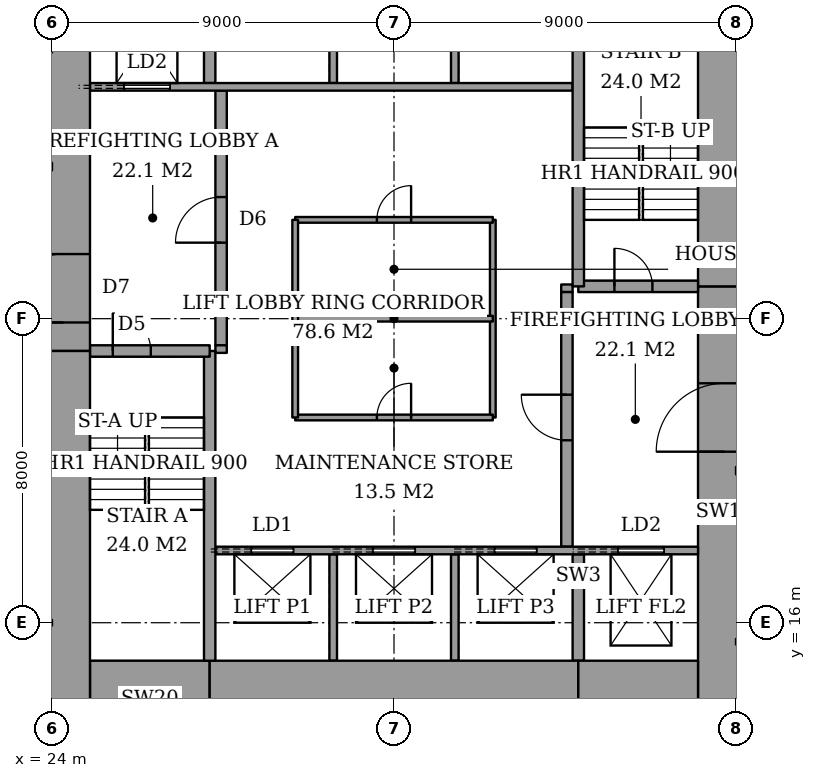
"""IFC4 building model, lengths in metres.
Left out: names, types, materials, properties, quantities, classifications, styles, units other than length and angle.
Written with IfcOpenShell. Run it as: python <this file> out.ifc"""

import sys

from ifc_helpers import new_model, si_unit, direction, frame, frame_2d, origin, place, context, subcontext, project, spatial, rectangle, extrude, element, fill, save


model = new_model("IFC4")
c1 = context("Model", 3, precision=1e-05, world=origin(), true_north=direction((0.0, 1.0)))
c2 = subcontext(c1, "Body", "Model", "MODEL_VIEW")
j1 = project(units=[si_unit("LENGTHUNIT", "METRE"), si_unit("PLANEANGLEUNIT", "RADIAN")], contexts=[c1])
p1 = place(None, origin())
s1 = spatial("IfcSite", under=j1, at=p1, CompositionType="ELEMENT")
p2 = place(p1, origin())
s2 = spatial("IfcBuilding", under=s1, at=p2, CompositionType="ELEMENT")
p3 = place(p2, frame((0.0, 0.0, 40.4)))
s3 = spatial("IfcBuildingStorey", under=s2, at=p3, CompositionType="ELEMENT", Elevation=40.4)
p4 = place(p3, frame((25.0, 14.0, 0.0), z_axis=(0.0, 0.0, 1.0), x_axis=(1.0, 0.0, 0.0)))
e1 = element("IfcWall", 1, at=p4, inside=s3, PredefinedType="SHEAR", context=c2, shape_type="SweptSolid", body=[
    extrude(rectangle(XDim=3.15, YDim=2.0, at=frame_2d((1.575, 0.0))), origin(), (0.0, 0.0, 1.0), 3.6),
])
p5 = place(p3, frame((28.15, 14.0, 0.0), z_axis=(0.0, 0.0, 1.0), x_axis=(1.0, 0.0, 0.0)))
e2 = element("IfcWall", 2, at=p5, inside=s3, PredefinedType="SHEAR", context=c2, shape_type="SweptSolid", body=[
    extrude(rectangle(XDim=9.7, YDim=2.0, at=frame_2d((4.85, 0.0))), origin(), (0.0, 0.0, 1.0), 3.6),
])
p6 = place(p3, frame((37.85, 14.0, 0.0), z_axis=(0.0, 0.0, 1.0), x_axis=(1.0, 0.0, 0.0)))
e3 = element("IfcWall", 3, at=p6, inside=s3, PredefinedType="SHEAR", context=c2, shape_type="SweptSolid", body=[
    extrude(rectangle(XDim=3.15, YDim=2.0, at=frame_2d((1.575, 0.0))), origin(), (0.0, 0.0, 1.0), 3.6),
])
p7 = place(p3, frame((24.3, 13.0, 0.0), z_axis=(0.0, 0.0, 1.0), x_axis=(0.0, 1.0, 0.0)))
e4 = element("IfcWall", 4, at=p7, inside=s3, PredefinedType="SHEAR", context=c2, shape_type="SweptSolid", body=[
    extrude(rectangle(XDim=10.15, YDim=1.4, at=frame_2d((5.075, 0.0))), origin(), (0.0, 0.0, 1.0), 3.6),
])
p8 = place(p3, frame((24.3, 23.15, 0.0), z_axis=(0.0, 0.0, 1.0), x_axis=(0.0, 1.0, 0.0)))
e5 = element("IfcWall", 5, at=p8, inside=s3, PredefinedType="SHEAR", context=c2, shape_type="SweptSolid", body=[
    extrude(rectangle(XDim=11.85, YDim=1.4, at=frame_2d((5.925, 0.0))), origin(), (0.0, 0.0, 1.0), 3.6),
])
p9 = place(p8, frame((0.75, 0.0, 0.0)))
e6 = element("IfcOpeningElement", 6, at=p9, cuts=e5, PredefinedType="OPENING", context=c2, shape_type="SweptSolid", body=[
    extrude(rectangle(XDim=1.8, YDim=2.4, at=frame_2d((0.9, 1.2))), frame((0.0, 0.71, 0.0), z_axis=(0.0, -1.0, 0.0), x_axis=(1.0, 0.0, 0.0)), (0.0, 0.0, 1.0), 1.42),
])
p10 = place(p3, frame((41.7, 13.0, 0.0), z_axis=(0.0, 0.0, 1.0), x_axis=(0.0, 1.0, 0.0)))
e7 = element("IfcWall", 7, at=p10, inside=s3, PredefinedType="SHEAR", context=c2, shape_type="SweptSolid", body=[
    extrude(rectangle(XDim=11.85, YDim=1.4, at=frame_2d((5.925, 0.0))), origin(), (0.0, 0.0, 1.0), 3.6),
])
p11 = place(p10, frame((7.5, 0.0, 0.0)))
e8 = element("IfcOpeningElement", 8, at=p11, cuts=e7, PredefinedType="OPENING", context=c2, shape_type="SweptSolid", body=[
    extrude(rectangle(XDim=1.8, YDim=2.4, at=frame_2d((0.9, 1.2))), frame((0.0, 0.71, 0.0), z_axis=(0.0, -1.0, 0.0), x_axis=(1.0, 0.0, 0.0)), (0.0, 0.0, 1.0), 1.42),
])
p12 = place(p3, frame((41.7, 24.85, 0.0), z_axis=(0.0, 0.0, 1.0), x_axis=(0.0, 1.0, 0.0)))
e9 = element("IfcWall", 9, at=p12, inside=s3, PredefinedType="SHEAR", context=c2, shape_type="SweptSolid", body=[
    extrude(rectangle(XDim=10.15, YDim=1.4, at=frame_2d((5.075, 0.0))), origin(), (0.0, 0.0, 1.0), 3.6),
])
p13 = place(p3, frame((28.15, 15.0, 0.0), z_axis=(0.0, 0.0, 1.0), x_axis=(0.0, 1.0, 0.0)))
e10 = element("IfcWall", 10, at=p13, inside=s3, PredefinedType="SHEAR", context=c2, shape_type="SweptSolid", body=[
    extrude(rectangle(XDim=8.15, YDim=0.3, at=frame_2d((4.075, 0.0))), origin(), (0.0, 0.0, 1.0), 3.6),
])
p14 = place(p3, frame((25.0, 23.15, 0.0), z_axis=(0.0, 0.0, 1.0), x_axis=(1.0, 0.0, 0.0)))
e11 = element("IfcWall", 11, at=p14, inside=s3, PredefinedType="SHEAR", context=c2, shape_type="SweptSolid", body=[
    extrude(rectangle(XDim=3.15, YDim=0.3, at=frame_2d((1.575, 0.0))), origin(), (0.0, 0.0, 1.0), 3.6),
])
p15 = place(p14, frame((0.6, 0.0, 0.0)))
e12 = element("IfcOpeningElement", 12, at=p15, cuts=e11, PredefinedType="OPENING", context=c2, shape_type="SweptSolid", body=[
    extrude(rectangle(XDim=1.0, YDim=2.1, at=frame_2d((0.5, 1.05))), frame((0.0, 0.16, 0.0), z_axis=(0.0, -1.0, 0.0), x_axis=(1.0, 0.0, 0.0)), (0.0, 0.0, 1.0), 0.32),
])
p16 = place(p3, frame((37.85, 24.85, 0.0), z_axis=(0.0, 0.0, 1.0), x_axis=(0.0, 1.0, 0.0)))
e13 = element("IfcWall", 13, at=p16, inside=s3, PredefinedType="SHEAR", context=c2, shape_type="SweptSolid", body=[
    extrude(rectangle(XDim=8.15, YDim=0.3, at=frame_2d((4.075, 0.0))), origin(), (0.0, 0.0, 1.0), 3.6),
])
p17 = place(p3, frame((37.85, 24.85, 0.0), z_axis=(0.0, 0.0, 1.0), x_axis=(1.0, 0.0, 0.0)))
e14 = element("IfcWall", 14, at=p17, inside=s3, PredefinedType="SHEAR", context=c2, shape_type="SweptSolid", body=[
    extrude(rectangle(XDim=3.15, YDim=0.3, at=frame_2d((1.575, 0.0))), origin(), (0.0, 0.0, 1.0), 3.6),
])
p18 = place(p17, frame((0.95, 0.0, 0.0)))
e15 = element("IfcOpeningElement", 15, at=p18, cuts=e14, PredefinedType="OPENING", context=c2, shape_type="SweptSolid", body=[
    extrude(rectangle(XDim=1.0, YDim=2.1, at=frame_2d((0.5, 1.05))), frame((0.0, 0.16, 0.0), z_axis=(0.0, -1.0, 0.0), x_axis=(1.0, 0.0, 0.0)), (0.0, 0.0, 1.0), 0.32),
])
p19 = place(p3, frame((28.45, 23.3, 0.0), z_axis=(0.0, 0.0, 1.0), x_axis=(0.0, 1.0, 0.0)))
e16 = element("IfcWall", 16, at=p19, inside=s3, PredefinedType="PARTITIONING", context=c2, shape_type="SweptSolid", body=[
    extrude(rectangle(XDim=6.7, YDim=0.3, at=frame_2d((3.35, 0.0))), origin(), (0.0, 0.0, 1.0), 3.6),
])
p20 = place(p19, frame((2.7, 0.0, 0.0)))
e17 = element("IfcOpeningElement", 17, at=p20, cuts=e16, PredefinedType="OPENING", context=c2, shape_type="SweptSolid", body=[
    extrude(rectangle(XDim=1.2, YDim=2.1, at=frame_2d((0.6, 1.05))), frame((0.0, 0.16, 0.0), z_axis=(0.0, -1.0, 0.0), x_axis=(1.0, 0.0, 0.0)), (0.0, 0.0, 1.0), 0.32),
])
p21 = place(p3, frame((37.55, 18.0, 0.0), z_axis=(0.0, 0.0, 1.0), x_axis=(0.0, 1.0, 0.0)))
e18 = element("IfcWall", 18, at=p21, inside=s3, PredefinedType="PARTITIONING", context=c2, shape_type="SweptSolid", body=[
    extrude(rectangle(XDim=6.7, YDim=0.3, at=frame_2d((3.35, 0.0))), origin(), (0.0, 0.0, 1.0), 3.6),
])
p22 = place(p21, frame((2.8, 0.0, 0.0)))
e19 = element("IfcOpeningElement", 19, at=p22, cuts=e18, PredefinedType="OPENING", context=c2, shape_type="SweptSolid", body=[
    extrude(rectangle(XDim=1.2, YDim=2.1, at=frame_2d((0.6, 1.05))), frame((0.0, 0.16, 0.0), z_axis=(0.0, -1.0, 0.0), x_axis=(1.0, 0.0, 0.0)), (0.0, 0.0, 1.0), 0.32),
])
p23 = place(p3, frame((28.3, 17.9, 0.0), z_axis=(0.0, 0.0, 1.0), x_axis=(1.0, 0.0, 0.0)))
e20 = element("IfcWall", 20, at=p23, inside=s3, PredefinedType="PARTITIONING", context=c2, shape_type="SweptSolid", body=[
    extrude(rectangle(XDim=12.7, YDim=0.2, at=frame_2d((6.35, 0.0))), origin(), (0.0, 0.0, 1.0), 3.6),
])
p24 = place(p23, frame((0.95, 0.0, 0.0)))
e21 = element("IfcOpeningElement", 21, at=p24, cuts=e20, PredefinedType="OPENING", context=c2, shape_type="SweptSolid", body=[
    extrude(rectangle(XDim=1.1, YDim=2.1, at=frame_2d((0.55, 1.05))), frame((0.0, 0.11, 0.0), z_axis=(0.0, -1.0, 0.0), x_axis=(1.0, 0.0, 0.0)), (0.0, 0.0, 1.0), 0.22),
])
p25 = place(p23, frame((4.15, 0.0, 0.0)))
e22 = element("IfcOpeningElement", 22, at=p25, cuts=e20, PredefinedType="OPENING", context=c2, shape_type="SweptSolid", body=[
    extrude(rectangle(XDim=1.1, YDim=2.1, at=frame_2d((0.55, 1.05))), frame((0.0, 0.11, 0.0), z_axis=(0.0, -1.0, 0.0), x_axis=(1.0, 0.0, 0.0)), (0.0, 0.0, 1.0), 0.22),
])
p26 = place(p23, frame((7.35, 0.0, 0.0)))
e23 = element("IfcOpeningElement", 23, at=p26, cuts=e20, PredefinedType="OPENING", context=c2, shape_type="SweptSolid", body=[
    extrude(rectangle(XDim=1.1, YDim=2.1, at=frame_2d((0.55, 1.05))), frame((0.0, 0.11, 0.0), z_axis=(0.0, -1.0, 0.0), x_axis=(1.0, 0.0, 0.0)), (0.0, 0.0, 1.0), 0.22),
])
p27 = place(p23, frame((10.6, 0.0, 0.0)))
e24 = element("IfcOpeningElement", 24, at=p27, cuts=e20, PredefinedType="OPENING", context=c2, shape_type="SweptSolid", body=[
    extrude(rectangle(XDim=1.2, YDim=2.1, at=frame_2d((0.6, 1.05))), frame((0.0, 0.11, 0.0), z_axis=(0.0, -1.0, 0.0), x_axis=(1.0, 0.0, 0.0)), (0.0, 0.0, 1.0), 0.22),
])
p28 = place(p3, frame((25.0, 30.1, 0.0), z_axis=(0.0, 0.0, 1.0), x_axis=(1.0, 0.0, 0.0)))
e25 = element("IfcWall", 25, at=p28, inside=s3, PredefinedType="PARTITIONING", context=c2, shape_type="SweptSolid", body=[
    extrude(rectangle(XDim=12.7, YDim=0.2, at=frame_2d((6.35, 0.0))), origin(), (0.0, 0.0, 1.0), 3.6),
])
p29 = place(p28, frame((0.9, 0.0, 0.0)))
e26 = element("IfcOpeningElement", 26, at=p29, cuts=e25, PredefinedType="OPENING", context=c2, shape_type="SweptSolid", body=[
    extrude(rectangle(XDim=1.2, YDim=2.1, at=frame_2d((0.6, 1.05))), frame((0.0, 0.11, 0.0), z_axis=(0.0, -1.0, 0.0), x_axis=(1.0, 0.0, 0.0)), (0.0, 0.0, 1.0), 0.22),
])
for number, where, z_axis, x_axis in (
    (27, (31.4, 15.0, 0.0), (0.0, 0.0, 1.0), (0.0, 1.0, 0.0)),
    (28, (34.6, 15.0, 0.0), (0.0, 0.0, 1.0), (0.0, 1.0, 0.0)),
):
    element("IfcWall", number, at=place(p3, frame(where, z_axis=z_axis, x_axis=x_axis)), inside=s3, PredefinedType="PARTITIONING", context=c2, shape_type="SweptSolid", body=[
        extrude(rectangle(XDim=2.8, YDim=0.2, at=frame_2d((1.4, 0.0))), origin(), (0.0, 0.0, 1.0), 3.6),
    ])
p30 = place(p3, frame((37.85, 15.0, 0.0), z_axis=(0.0, 0.0, 1.0), x_axis=(0.0, 1.0, 0.0)))
e29 = element("IfcWall", 29, at=p30, inside=s3, PredefinedType="SHEAR", context=c2, shape_type="SweptSolid", body=[
    extrude(rectangle(XDim=2.8, YDim=0.3, at=frame_2d((1.4, 0.0))), origin(), (0.0, 0.0, 1.0), 3.6),
])
for number, where, z_axis, x_axis in (
    (30, (31.4, 30.2, 0.0), (0.0, 0.0, 1.0), (0.0, 1.0, 0.0)),
    (31, (34.6, 30.2, 0.0), (0.0, 0.0, 1.0), (0.0, 1.0, 0.0)),
):
    element("IfcWall", number, at=place(p3, frame(where, z_axis=z_axis, x_axis=x_axis)), inside=s3, PredefinedType="PARTITIONING", context=c2, shape_type="SweptSolid", body=[
        extrude(rectangle(XDim=2.8, YDim=0.2, at=frame_2d((1.4, 0.0))), origin(), (0.0, 0.0, 1.0), 3.6),
    ])
p31 = place(p3, frame((28.15, 30.2, 0.0), z_axis=(0.0, 0.0, 1.0), x_axis=(0.0, 1.0, 0.0)))
e32 = element("IfcWall", 32, at=p31, inside=s3, PredefinedType="SHEAR", context=c2, shape_type="SweptSolid", body=[
    extrude(rectangle(XDim=2.8, YDim=0.3, at=frame_2d((1.4, 0.0))), origin(), (0.0, 0.0, 1.0), 3.6),
])
for number, where, z_axis, x_axis in (
    (33, (28.3, 23.2, 0.0), (0.0, 0.0, 1.0), (1.0, 0.0, 0.0)),
    (34, (37.4, 24.8, 0.0), (0.0, 0.0, 1.0), (1.0, 0.0, 0.0)),
):
    element("IfcWall", number, at=place(p3, frame(where, z_axis=z_axis, x_axis=x_axis)), inside=s3, PredefinedType="PARTITIONING", context=c2, shape_type="SweptSolid", body=[
        extrude(rectangle(XDim=0.3, YDim=0.2, at=frame_2d((0.15, 0.0))), origin(), (0.0, 0.0, 1.0), 3.6),
    ])
p32 = place(p3, frame((30.4, 21.4, 0.0), z_axis=(0.0, 0.0, 1.0), x_axis=(1.0, 0.0, 0.0)))
e35 = element("IfcWall", 35, at=p32, inside=s3, PredefinedType="PARTITIONING", context=c2, shape_type="SweptSolid", body=[
    extrude(rectangle(XDim=5.2, YDim=0.15, at=frame_2d((2.6, 0.0))), origin(), (0.0, 0.0, 1.0), 3.35),
])
p33 = place(p32, frame((2.15, 0.0, 0.0)))
e36 = element("IfcOpeningElement", 36, at=p33, cuts=e35, PredefinedType="OPENING", context=c2, shape_type="SweptSolid", body=[
    extrude(rectangle(XDim=0.9, YDim=2.1, at=frame_2d((0.45, 1.05))), frame((0.0, 0.085, 0.0), z_axis=(0.0, -1.0, 0.0), x_axis=(1.0, 0.0, 0.0)), (0.0, 0.0, 1.0), 0.17),
])
p34 = place(p3, frame((30.4, 26.6, 0.0), z_axis=(0.0, 0.0, 1.0), x_axis=(1.0, 0.0, 0.0)))
e37 = element("IfcWall", 37, at=p34, inside=s3, PredefinedType="PARTITIONING", context=c2, shape_type="SweptSolid", body=[
    extrude(rectangle(XDim=5.2, YDim=0.15, at=frame_2d((2.6, 0.0))), origin(), (0.0, 0.0, 1.0), 3.35),
])
p35 = place(p34, frame((2.15, 0.0, 0.0)))
e38 = element("IfcOpeningElement", 38, at=p35, cuts=e37, PredefinedType="OPENING", context=c2, shape_type="SweptSolid", body=[
    extrude(rectangle(XDim=0.9, YDim=2.1, at=frame_2d((0.45, 1.05))), frame((0.0, 0.085, 0.0), z_axis=(0.0, -1.0, 0.0), x_axis=(1.0, 0.0, 0.0)), (0.0, 0.0, 1.0), 0.17),
])
for number, where, z_axis, x_axis in (
    (39, (30.4, 21.4, 0.0), (0.0, 0.0, 1.0), (0.0, 1.0, 0.0)),
    (40, (35.6, 21.4, 0.0), (0.0, 0.0, 1.0), (0.0, 1.0, 0.0)),
    (41, (30.4, 24.0, 0.0), (0.0, 0.0, 1.0), (1.0, 0.0, 0.0)),
):
    element("IfcWall", number, at=place(p3, frame(where, z_axis=z_axis, x_axis=x_axis)), inside=s3, PredefinedType="PARTITIONING", context=c2, shape_type="SweptSolid", body=[
        extrude(rectangle(XDim=5.2, YDim=0.15, at=frame_2d((2.6, 0.0))), origin(), (0.0, 0.0, 1.0), 3.35),
    ])
p36 = place(p15, origin())
e42 = element("IfcDoor", 42, at=p36, inside=s3, OperationType="SINGLE_SWING_RIGHT", PredefinedType="DOOR", context=c2, shape_type="SweptSolid", body=[
    extrude(rectangle(XDim=1.0, YDim=2.1, at=frame_2d((0.5, 1.05))), frame((0.0, 0.025, 0.0), z_axis=(0.0, -1.0, 0.0), x_axis=(1.0, 0.0, 0.0)), (0.0, 0.0, 1.0), 0.05),
])
fill(e12, e42)
p37 = place(p18, origin())
e43 = element("IfcDoor", 43, at=p37, inside=s3, OperationType="SINGLE_SWING_RIGHT", PredefinedType="DOOR", context=c2, shape_type="SweptSolid", body=[
    extrude(rectangle(XDim=1.0, YDim=2.1, at=frame_2d((0.5, 1.05))), frame((0.0, 0.025, 0.0), z_axis=(0.0, -1.0, 0.0), x_axis=(1.0, 0.0, 0.0)), (0.0, 0.0, 1.0), 0.05),
])
fill(e15, e43)
p38 = place(p20, origin())
e44 = element("IfcDoor", 44, at=p38, inside=s3, OperationType="SINGLE_SWING_RIGHT", PredefinedType="DOOR", context=c2, shape_type="SweptSolid", body=[
    extrude(rectangle(XDim=1.2, YDim=2.1, at=frame_2d((0.6, 1.05))), frame((0.0, 0.025, 0.0), z_axis=(0.0, -1.0, 0.0), x_axis=(1.0, 0.0, 0.0)), (0.0, 0.0, 1.0), 0.05),
])
fill(e17, e44)
p39 = place(p22, origin())
e45 = element("IfcDoor", 45, at=p39, inside=s3, OperationType="SINGLE_SWING_LEFT", PredefinedType="DOOR", context=c2, shape_type="SweptSolid", body=[
    extrude(rectangle(XDim=1.2, YDim=2.1, at=frame_2d((0.6, 1.05))), frame((0.0, 0.025, 0.0), z_axis=(0.0, -1.0, 0.0), x_axis=(1.0, 0.0, 0.0)), (0.0, 0.0, 1.0), 0.05),
])
fill(e19, e45)
p40 = place(p9, origin())
e46 = element("IfcDoor", 46, at=p40, inside=s3, OperationType="DOUBLE_DOOR_DOUBLE_SWING", PredefinedType="DOOR", context=c2, shape_type="SweptSolid", body=[
    extrude(rectangle(XDim=1.8, YDim=2.4, at=frame_2d((0.9, 1.2))), frame((0.0, 0.025, 0.0), z_axis=(0.0, -1.0, 0.0), x_axis=(1.0, 0.0, 0.0)), (0.0, 0.0, 1.0), 0.05),
])
fill(e6, e46)
p41 = place(p11, origin())
e47 = element("IfcDoor", 47, at=p41, inside=s3, OperationType="DOUBLE_DOOR_DOUBLE_SWING", PredefinedType="DOOR", context=c2, shape_type="SweptSolid", body=[
    extrude(rectangle(XDim=1.8, YDim=2.4, at=frame_2d((0.9, 1.2))), frame((0.0, 0.025, 0.0), z_axis=(0.0, -1.0, 0.0), x_axis=(1.0, 0.0, 0.0)), (0.0, 0.0, 1.0), 0.05),
])
fill(e8, e47)
p42 = place(p33, origin())
e48 = element("IfcDoor", 48, at=p42, inside=s3, OperationType="SINGLE_SWING_LEFT", PredefinedType="DOOR", context=c2, shape_type="SweptSolid", body=[
    extrude(rectangle(XDim=0.9, YDim=2.1, at=frame_2d((0.45, 1.05))), frame((0.0, 0.025, 0.0), z_axis=(0.0, -1.0, 0.0), x_axis=(1.0, 0.0, 0.0)), (0.0, 0.0, 1.0), 0.05),
])
fill(e36, e48)
p43 = place(p35, origin())
e49 = element("IfcDoor", 49, at=p43, inside=s3, OperationType="SINGLE_SWING_LEFT", PredefinedType="DOOR", context=c2, shape_type="SweptSolid", body=[
    extrude(rectangle(XDim=0.9, YDim=2.1, at=frame_2d((0.45, 1.05))), frame((0.0, 0.025, 0.0), z_axis=(0.0, -1.0, 0.0), x_axis=(1.0, 0.0, 0.0)), (0.0, 0.0, 1.0), 0.05),
])
fill(e38, e49)
p44 = place(p24, origin())
e50 = element("IfcDoor", 50, at=p44, inside=s3, OperationType="SLIDING_TO_LEFT", PredefinedType="DOOR", context=c2, shape_type="SweptSolid", body=[
    extrude(rectangle(XDim=1.1, YDim=2.1, at=frame_2d((0.55, 1.05))), frame((0.0, 0.025, 0.0), z_axis=(0.0, -1.0, 0.0), x_axis=(1.0, 0.0, 0.0)), (0.0, 0.0, 1.0), 0.05),
])
fill(e21, e50)
p45 = place(p25, origin())
e51 = element("IfcDoor", 51, at=p45, inside=s3, OperationType="SLIDING_TO_LEFT", PredefinedType="DOOR", context=c2, shape_type="SweptSolid", body=[
    extrude(rectangle(XDim=1.1, YDim=2.1, at=frame_2d((0.55, 1.05))), frame((0.0, 0.025, 0.0), z_axis=(0.0, -1.0, 0.0), x_axis=(1.0, 0.0, 0.0)), (0.0, 0.0, 1.0), 0.05),
])
fill(e22, e51)
p46 = place(p26, origin())
e52 = element("IfcDoor", 52, at=p46, inside=s3, OperationType="SLIDING_TO_LEFT", PredefinedType="DOOR", context=c2, shape_type="SweptSolid", body=[
    extrude(rectangle(XDim=1.1, YDim=2.1, at=frame_2d((0.55, 1.05))), frame((0.0, 0.025, 0.0), z_axis=(0.0, -1.0, 0.0), x_axis=(1.0, 0.0, 0.0)), (0.0, 0.0, 1.0), 0.05),
])
fill(e23, e52)
p47 = place(p29, origin())
e53 = element("IfcDoor", 53, at=p47, inside=s3, OperationType="SLIDING_TO_LEFT", PredefinedType="DOOR", context=c2, shape_type="SweptSolid", body=[
    extrude(rectangle(XDim=1.2, YDim=2.1, at=frame_2d((0.6, 1.05))), frame((0.0, 0.025, 0.0), z_axis=(0.0, -1.0, 0.0), x_axis=(1.0, 0.0, 0.0)), (0.0, 0.0, 1.0), 0.05),
])
fill(e26, e53)
p48 = place(p27, origin())
e54 = element("IfcDoor", 54, at=p48, inside=s3, OperationType="SLIDING_TO_LEFT", PredefinedType="DOOR", context=c2, shape_type="SweptSolid", body=[
    extrude(rectangle(XDim=1.2, YDim=2.1, at=frame_2d((0.6, 1.05))), frame((0.0, 0.025, 0.0), z_axis=(0.0, -1.0, 0.0), x_axis=(1.0, 0.0, 0.0)), (0.0, 0.0, 1.0), 0.05),
])
fill(e24, e54)
save(model, sys.argv[1])
